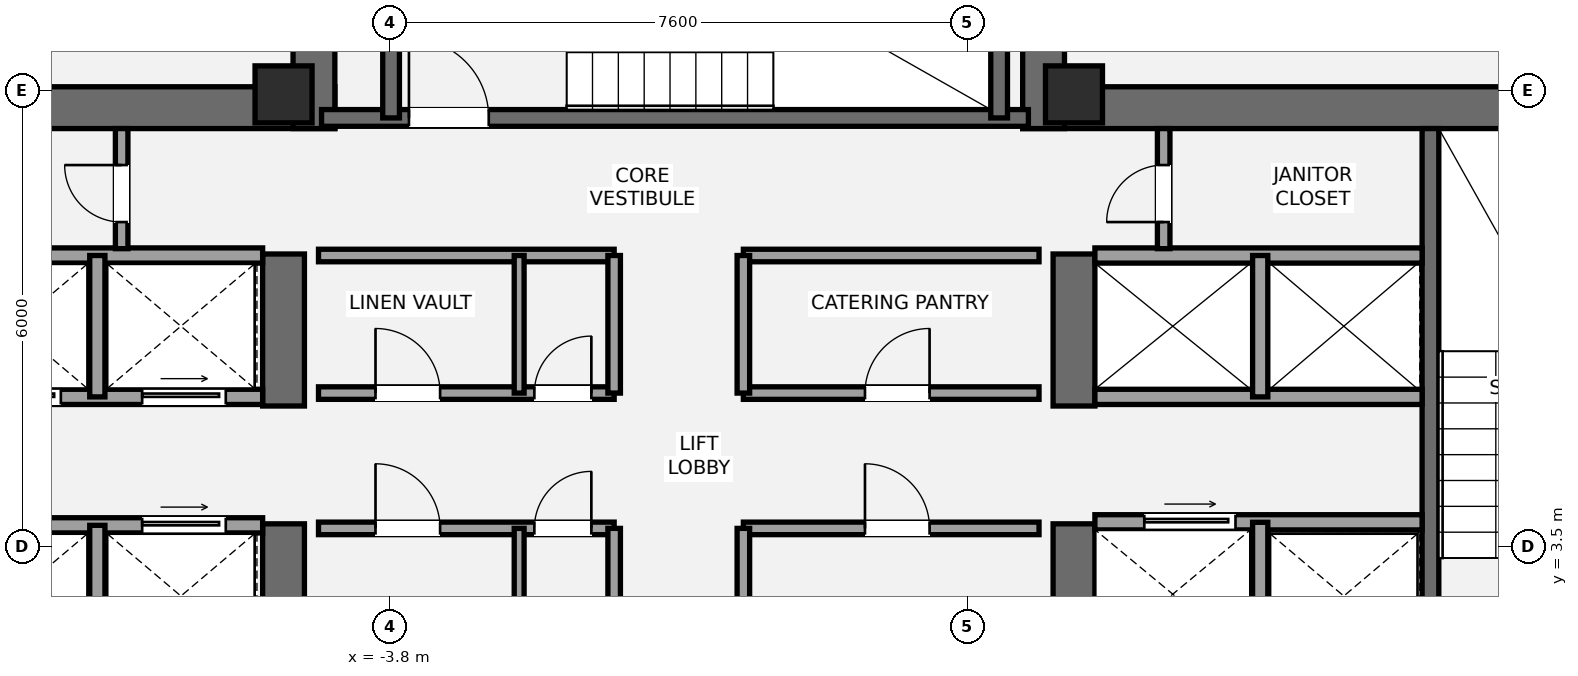
"""IFC4 building model, lengths in metres.
Left out: names, types, materials, properties, quantities, classifications, styles, units other than length and angle.
Written with IfcOpenShell. Run it as: python <this file> out.ifc"""

import sys

from ifc_helpers import new_model, si_unit, direction, frame, frame_2d, origin, origin_2d, place, context, subcontext, project, spatial, rectangle, extrude, element, fill, save


model = new_model("IFC4")
c1 = context("Model", 3, precision=1e-05, world=origin(), true_north=direction((0.0, 1.0)))
c2 = subcontext(c1, "Body", "Model", "MODEL_VIEW")
j1 = project(units=[si_unit("LENGTHUNIT", "METRE"), si_unit("PLANEANGLEUNIT", "RADIAN")], contexts=[c1])
p1 = place(None, origin())
s1 = spatial("IfcSite", under=j1, at=p1, CompositionType="ELEMENT")
p2 = place(p1, origin())
s2 = spatial("IfcBuilding", under=s1, at=p2, CompositionType="ELEMENT")
p3 = place(p2, frame((0.0, 0.0, 216.3)))
s3 = spatial("IfcBuildingStorey", under=s2, at=p3, CompositionType="ELEMENT", Elevation=216.3)
p4 = place(p3, frame((-13.7, 9.275, 0.0), z_axis=(0.0, 0.0, 1.0), x_axis=(1.0, 0.0, 0.0)))
e1 = element("IfcWall", 1, at=p4, inside=s3, PredefinedType="SHEAR", context=c2, shape_type="SweptSolid", body=[
    extrude(rectangle(XDim=9.175, YDim=0.55, at=frame_2d((4.587, 0.0))), origin(), (0.0, 0.0, 1.0), 3.15),
])
p5 = place(p3, frame((-5.2, 1.3, 0.0), z_axis=(0.0, 0.0, 1.0), x_axis=(0.0, 1.0, 0.0)))
e2 = element("IfcWall", 2, at=p5, inside=s3, PredefinedType="SHEAR", context=c2, shape_type="SweptSolid", body=[
    extrude(rectangle(XDim=2.5, YDim=0.55, at=frame_2d((1.25, 0.0))), origin(), (0.0, 0.0, 1.0), 3.15),
])
p6 = place(p3, frame((-5.2, 5.35, 0.0), z_axis=(0.0, 0.0, 1.0), x_axis=(0.0, 1.0, 0.0)))
e3 = element("IfcWall", 3, at=p6, inside=s3, PredefinedType="SHEAR", context=c2, shape_type="SweptSolid", body=[
    extrude(rectangle(XDim=2.0, YDim=0.55, at=frame_2d((1.0, 0.0))), origin(), (0.0, 0.0, 1.0), 3.15),
])
p7 = place(p3, frame((4.525, 9.275, 0.0), z_axis=(0.0, 0.0, 1.0), x_axis=(1.0, 0.0, 0.0)))
e4 = element("IfcWall", 4, at=p7, inside=s3, PredefinedType="SHEAR", context=c2, shape_type="SweptSolid", body=[
    extrude(rectangle(XDim=9.175, YDim=0.55, at=frame_2d((4.587, 0.0))), origin(), (0.0, 0.0, 1.0), 3.15),
])
p8 = place(p3, frame((5.2, 1.3, 0.0), z_axis=(0.0, 0.0, 1.0), x_axis=(0.0, 1.0, 0.0)))
e5 = element("IfcWall", 5, at=p8, inside=s3, PredefinedType="SHEAR", context=c2, shape_type="SweptSolid", body=[
    extrude(rectangle(XDim=2.5, YDim=0.55, at=frame_2d((1.25, 0.0))), origin(), (0.0, 0.0, 1.0), 3.15),
])
p9 = place(p3, frame((5.2, 5.35, 0.0), z_axis=(0.0, 0.0, 1.0), x_axis=(0.0, 1.0, 0.0)))
e6 = element("IfcWall", 6, at=p9, inside=s3, PredefinedType="SHEAR", context=c2, shape_type="SweptSolid", body=[
    extrude(rectangle(XDim=2.0, YDim=0.55, at=frame_2d((1.0, 0.0))), origin(), (0.0, 0.0, 1.0), 3.15),
])
p10 = place(p3, frame((9.89, 1.85, 0.0), z_axis=(0.0, 0.0, 1.0), x_axis=(0.0, 1.0, 0.0)))
e7 = element("IfcWall", 7, at=p10, inside=s3, PredefinedType="SHEAR", context=c2, shape_type="SweptSolid", body=[
    extrude(rectangle(XDim=7.15, YDim=0.22, at=frame_2d((3.575, 0.0))), origin(), (0.0, 0.0, 1.0), 3.15),
])
for number, where, z_axis, x_axis in (
    (8, (-4.8, 9.0, 0.0), (0.0, 0.0, 1.0), (0.0, 1.0, 0.0)),
    (9, (4.8, 9.0, 0.0), (0.0, 0.0, 1.0), (0.0, 1.0, 0.0)),
):
    element("IfcWall", number, at=place(p3, frame(where, z_axis=z_axis, x_axis=x_axis)), inside=s3, PredefinedType="SHEAR", context=c2, shape_type="SweptSolid", body=[
        extrude(rectangle(XDim=3.95, YDim=0.55, at=frame_2d((1.975, 0.0))), origin(), (0.0, 0.0, 1.0), 3.15),
    ])
p11 = place(p3, frame((-4.7, 9.14, 0.0), z_axis=(0.0, 0.0, 1.0), x_axis=(1.0, 0.0, 0.0)))
e10 = element("IfcWall", 10, at=p11, inside=s3, PredefinedType="SHEAR", context=c2, shape_type="SweptSolid", body=[
    extrude(rectangle(XDim=9.3, YDim=0.22, at=frame_2d((4.65, 0.0))), origin(), (0.0, 0.0, 1.0), 3.15),
])
p12 = place(p11, frame((1.15, 0.0, 0.0)))
e11 = element("IfcOpeningElement", 11, at=p12, cuts=e10, PredefinedType="OPENING", context=c2, shape_type="SweptSolid", body=[
    extrude(rectangle(XDim=1.05, YDim=2.15, at=frame_2d((0.525, 1.075))), frame((0.0, 0.12, 0.0), z_axis=(0.0, -1.0, 0.0), x_axis=(1.0, 0.0, 0.0)), (0.0, 0.0, 1.0), 0.24),
])
for number, where, z_axis, x_axis in (
    (12, (-3.785, 9.14, 0.0), (0.0, 0.0, 1.0), (0.0, 1.0, 0.0)),
    (13, (4.215, 9.14, 0.0), (0.0, 0.0, 1.0), (0.0, 1.0, 0.0)),
):
    element("IfcWall", number, at=place(p3, frame(where, z_axis=z_axis, x_axis=x_axis)), inside=s3, PredefinedType="SHEAR", context=c2, shape_type="SweptSolid", body=[
        extrude(rectangle(XDim=3.26, YDim=0.22, at=frame_2d((1.63, 0.0))), origin(), (0.0, 0.0, 1.0), 3.15),
    ])
for number, where, z_axis, x_axis in (
    (14, (-5.2, 9.45, 0.0), (0.0, 0.0, 1.0), (1.0, 0.0, 0.0)),
    (15, (5.2, 9.45, 0.0), (0.0, 0.0, 1.0), (1.0, 0.0, 0.0)),
):
    element("IfcColumn", number, at=place(p3, frame(where, z_axis=z_axis, x_axis=x_axis)), inside=s3, PredefinedType="PILASTER", context=c2, shape_type="SweptSolid", body=[
        extrude(rectangle(XDim=0.75, YDim=0.75, at=origin_2d()), origin(), (0.0, 0.0, 1.0), 3.15),
    ])
p13 = place(p3, frame((-9.78, 3.78, 0.0), z_axis=(0.0, 0.0, 1.0), x_axis=(1.0, 0.0, 0.0)))
e16 = element("IfcWall", 16, at=p13, inside=s3, PredefinedType="SOLIDWALL", context=c2, shape_type="SweptSolid", body=[
    extrude(rectangle(XDim=4.305, YDim=0.2, at=frame_2d((2.152, 0.0))), origin(), (0.0, 0.0, 1.0), 2.97),
])
p14 = place(p13, frame((2.72, 0.0, 0.0)))
e17 = element("IfcOpeningElement", 17, at=p14, cuts=e16, PredefinedType="OPENING", context=c2, shape_type="SweptSolid", body=[
    extrude(rectangle(XDim=1.1, YDim=2.2, at=frame_2d((0.55, 1.1))), frame((0.0, 0.11, 0.0), z_axis=(0.0, -1.0, 0.0), x_axis=(1.0, 0.0, 0.0)), (0.0, 0.0, 1.0), 0.22),
])
p15 = place(p3, frame((-7.65, 1.85, 0.0), z_axis=(0.0, 0.0, 1.0), x_axis=(0.0, 1.0, 0.0)))
e18 = element("IfcWall", 18, at=p15, inside=s3, PredefinedType="SOLIDWALL", context=c2, shape_type="SweptSolid", body=[
    extrude(rectangle(XDim=1.93, YDim=0.2, at=frame_2d((0.965, 0.0))), origin(), (0.0, 0.0, 1.0), 2.97),
])
p16 = place(p3, frame((-9.78, 5.47, 0.0), z_axis=(0.0, 0.0, 1.0), x_axis=(1.0, 0.0, 0.0)))
e19 = element("IfcWall", 19, at=p16, inside=s3, PredefinedType="SOLIDWALL", context=c2, shape_type="SweptSolid", body=[
    extrude(rectangle(XDim=4.305, YDim=0.2, at=frame_2d((2.152, 0.0))), origin(), (0.0, 0.0, 1.0), 2.97),
])
p17 = place(p16, frame((0.55, 0.0, 0.0)))
e20 = element("IfcOpeningElement", 20, at=p17, cuts=e19, PredefinedType="OPENING", context=c2, shape_type="SweptSolid", body=[
    extrude(rectangle(XDim=1.1, YDim=2.2, at=frame_2d((0.55, 1.1))), frame((0.0, 0.11, 0.0), z_axis=(0.0, -1.0, 0.0), x_axis=(1.0, 0.0, 0.0)), (0.0, 0.0, 1.0), 0.22),
])
p18 = place(p16, frame((2.72, 0.0, 0.0)))
e21 = element("IfcOpeningElement", 21, at=p18, cuts=e19, PredefinedType="OPENING", context=c2, shape_type="SweptSolid", body=[
    extrude(rectangle(XDim=1.1, YDim=2.2, at=frame_2d((0.55, 1.1))), frame((0.0, 0.11, 0.0), z_axis=(0.0, -1.0, 0.0), x_axis=(1.0, 0.0, 0.0)), (0.0, 0.0, 1.0), 0.22),
])
p19 = place(p3, frame((-9.78, 7.33, 0.0), z_axis=(0.0, 0.0, 1.0), x_axis=(1.0, 0.0, 0.0)))
e22 = element("IfcWall", 22, at=p19, inside=s3, PredefinedType="SOLIDWALL", context=c2, shape_type="SweptSolid", body=[
    extrude(rectangle(XDim=4.305, YDim=0.2, at=frame_2d((2.152, 0.0))), origin(), (0.0, 0.0, 1.0), 2.97),
])
p20 = place(p3, frame((-7.65, 5.47, 0.0), z_axis=(0.0, 0.0, 1.0), x_axis=(0.0, 1.0, 0.0)))
e23 = element("IfcWall", 23, at=p20, inside=s3, PredefinedType="SOLIDWALL", context=c2, shape_type="SweptSolid", body=[
    extrude(rectangle(XDim=1.86, YDim=0.2, at=frame_2d((0.93, 0.0))), origin(), (0.0, 0.0, 1.0), 2.97),
])
p21 = place(p3, frame((5.475, 3.82, 0.0), z_axis=(0.0, 0.0, 1.0), x_axis=(1.0, 0.0, 0.0)))
e24 = element("IfcWall", 24, at=p21, inside=s3, PredefinedType="SOLIDWALL", context=c2, shape_type="SweptSolid", body=[
    extrude(rectangle(XDim=4.305, YDim=0.2, at=frame_2d((2.152, 0.0))), origin(), (0.0, 0.0, 1.0), 2.97),
])
p22 = place(p21, frame((0.65, 0.0, 0.0)))
e25 = element("IfcOpeningElement", 25, at=p22, cuts=e24, PredefinedType="OPENING", context=c2, shape_type="SweptSolid", body=[
    extrude(rectangle(XDim=1.2, YDim=2.2, at=frame_2d((0.6, 1.1))), frame((0.0, 0.11, 0.0), z_axis=(0.0, -1.0, 0.0), x_axis=(1.0, 0.0, 0.0)), (0.0, 0.0, 1.0), 0.22),
])
p23 = place(p3, frame((7.65, 1.85, 0.0), z_axis=(0.0, 0.0, 1.0), x_axis=(0.0, 1.0, 0.0)))
e26 = element("IfcWall", 26, at=p23, inside=s3, PredefinedType="SOLIDWALL", context=c2, shape_type="SweptSolid", body=[
    extrude(rectangle(XDim=1.97, YDim=0.2, at=frame_2d((0.985, 0.0))), origin(), (0.0, 0.0, 1.0), 2.97),
])
for number, where, z_axis, x_axis in (
    (27, (5.475, 5.47, 0.0), (0.0, 0.0, 1.0), (1.0, 0.0, 0.0)),
    (28, (5.475, 7.33, 0.0), (0.0, 0.0, 1.0), (1.0, 0.0, 0.0)),
):
    element("IfcWall", number, at=place(p3, frame(where, z_axis=z_axis, x_axis=x_axis)), inside=s3, PredefinedType="SOLIDWALL", context=c2, shape_type="SweptSolid", body=[
        extrude(rectangle(XDim=4.305, YDim=0.2, at=frame_2d((2.152, 0.0))), origin(), (0.0, 0.0, 1.0), 2.97),
    ])
p24 = place(p3, frame((7.65, 5.47, 0.0), z_axis=(0.0, 0.0, 1.0), x_axis=(0.0, 1.0, 0.0)))
e29 = element("IfcWall", 29, at=p24, inside=s3, PredefinedType="SOLIDWALL", context=c2, shape_type="SweptSolid", body=[
    extrude(rectangle(XDim=1.86, YDim=0.2, at=frame_2d((0.93, 0.0))), origin(), (0.0, 0.0, 1.0), 2.97),
])
p25 = place(p3, frame((-4.74, 3.74, 0.0), z_axis=(0.0, 0.0, 1.0), x_axis=(1.0, 0.0, 0.0)))
e30 = element("IfcWall", 30, at=p25, inside=s3, PredefinedType="PARTITIONING", context=c2, shape_type="SweptSolid", body=[
    extrude(rectangle(XDim=3.89, YDim=0.165, at=frame_2d((1.945, 0.0))), origin(), (0.0, 0.0, 1.0), 2.97),
])
p26 = place(p25, frame((0.75, 0.0, 0.0)))
e31 = element("IfcOpeningElement", 31, at=p26, cuts=e30, PredefinedType="OPENING", context=c2, shape_type="SweptSolid", body=[
    extrude(rectangle(XDim=0.85, YDim=2.1, at=frame_2d((0.425, 1.05))), frame((0.0, 0.093, 0.0), z_axis=(0.0, -1.0, 0.0), x_axis=(1.0, 0.0, 0.0)), (0.0, 0.0, 1.0), 0.185),
])
p27 = place(p25, frame((2.84, 0.0, 0.0)))
e32 = element("IfcOpeningElement", 32, at=p27, cuts=e30, PredefinedType="OPENING", context=c2, shape_type="SweptSolid", body=[
    extrude(rectangle(XDim=0.75, YDim=2.1, at=frame_2d((0.375, 1.05))), frame((0.0, 0.093, 0.0), z_axis=(0.0, -1.0, 0.0), x_axis=(1.0, 0.0, 0.0)), (0.0, 0.0, 1.0), 0.185),
])
p28 = place(p3, frame((-0.85, 1.92, 0.0), z_axis=(0.0, 0.0, 1.0), x_axis=(0.0, 1.0, 0.0)))
e33 = element("IfcWall", 33, at=p28, inside=s3, PredefinedType="PARTITIONING", context=c2, shape_type="SweptSolid", body=[
    extrude(rectangle(XDim=1.82, YDim=0.165, at=frame_2d((0.91, 0.0))), origin(), (0.0, 0.0, 1.0), 2.97),
])
p29 = place(p3, frame((0.85, 3.74, 0.0), z_axis=(0.0, 0.0, 1.0), x_axis=(1.0, 0.0, 0.0)))
e34 = element("IfcWall", 34, at=p29, inside=s3, PredefinedType="PARTITIONING", context=c2, shape_type="SweptSolid", body=[
    extrude(rectangle(XDim=3.89, YDim=0.165, at=frame_2d((1.945, 0.0))), origin(), (0.0, 0.0, 1.0), 2.97),
])
p30 = place(p29, frame((1.6, 0.0, 0.0)))
e35 = element("IfcOpeningElement", 35, at=p30, cuts=e34, PredefinedType="OPENING", context=c2, shape_type="SweptSolid", body=[
    extrude(rectangle(XDim=0.85, YDim=2.1, at=frame_2d((0.425, 1.05))), frame((0.0, 0.093, 0.0), z_axis=(0.0, -1.0, 0.0), x_axis=(1.0, 0.0, 0.0)), (0.0, 0.0, 1.0), 0.185),
])
p31 = place(p3, frame((0.85, 1.92, 0.0), z_axis=(0.0, 0.0, 1.0), x_axis=(0.0, 1.0, 0.0)))
e36 = element("IfcWall", 36, at=p31, inside=s3, PredefinedType="PARTITIONING", context=c2, shape_type="SweptSolid", body=[
    extrude(rectangle(XDim=1.82, YDim=0.165, at=frame_2d((0.91, 0.0))), origin(), (0.0, 0.0, 1.0), 2.97),
])
p32 = place(p3, frame((-2.1, 1.92, 0.0), z_axis=(0.0, 0.0, 1.0), x_axis=(0.0, 1.0, 0.0)))
e37 = element("IfcWall", 37, at=p32, inside=s3, PredefinedType="PARTITIONING", context=c2, shape_type="SweptSolid", body=[
    extrude(rectangle(XDim=1.82, YDim=0.13, at=frame_2d((0.91, 0.0))), origin(), (0.0, 0.0, 1.0), 2.97),
])
p33 = place(p3, frame((-4.74, 5.52, 0.0), z_axis=(0.0, 0.0, 1.0), x_axis=(1.0, 0.0, 0.0)))
e38 = element("IfcWall", 38, at=p33, inside=s3, PredefinedType="PARTITIONING", context=c2, shape_type="SweptSolid", body=[
    extrude(rectangle(XDim=3.89, YDim=0.165, at=frame_2d((1.945, 0.0))), origin(), (0.0, 0.0, 1.0), 2.97),
])
p34 = place(p33, frame((0.75, 0.0, 0.0)))
e39 = element("IfcOpeningElement", 39, at=p34, cuts=e38, PredefinedType="OPENING", context=c2, shape_type="SweptSolid", body=[
    extrude(rectangle(XDim=0.85, YDim=2.1, at=frame_2d((0.425, 1.05))), frame((0.0, 0.093, 0.0), z_axis=(0.0, -1.0, 0.0), x_axis=(1.0, 0.0, 0.0)), (0.0, 0.0, 1.0), 0.185),
])
p35 = place(p33, frame((2.84, 0.0, 0.0)))
e40 = element("IfcOpeningElement", 40, at=p35, cuts=e38, PredefinedType="OPENING", context=c2, shape_type="SweptSolid", body=[
    extrude(rectangle(XDim=0.75, YDim=2.1, at=frame_2d((0.375, 1.05))), frame((0.0, 0.093, 0.0), z_axis=(0.0, -1.0, 0.0), x_axis=(1.0, 0.0, 0.0)), (0.0, 0.0, 1.0), 0.185),
])
p36 = place(p3, frame((-4.74, 7.33, 0.0), z_axis=(0.0, 0.0, 1.0), x_axis=(1.0, 0.0, 0.0)))
e41 = element("IfcWall", 41, at=p36, inside=s3, PredefinedType="PARTITIONING", context=c2, shape_type="SweptSolid", body=[
    extrude(rectangle(XDim=3.89, YDim=0.165, at=frame_2d((1.945, 0.0))), origin(), (0.0, 0.0, 1.0), 2.97),
])
p37 = place(p3, frame((-0.85, 5.52, 0.0), z_axis=(0.0, 0.0, 1.0), x_axis=(0.0, 1.0, 0.0)))
e42 = element("IfcWall", 42, at=p37, inside=s3, PredefinedType="PARTITIONING", context=c2, shape_type="SweptSolid", body=[
    extrude(rectangle(XDim=1.81, YDim=0.165, at=frame_2d((0.905, 0.0))), origin(), (0.0, 0.0, 1.0), 2.97),
])
p38 = place(p3, frame((0.85, 5.52, 0.0), z_axis=(0.0, 0.0, 1.0), x_axis=(1.0, 0.0, 0.0)))
e43 = element("IfcWall", 43, at=p38, inside=s3, PredefinedType="PARTITIONING", context=c2, shape_type="SweptSolid", body=[
    extrude(rectangle(XDim=3.89, YDim=0.165, at=frame_2d((1.945, 0.0))), origin(), (0.0, 0.0, 1.0), 2.97),
])
p39 = place(p38, frame((1.6, 0.0, 0.0)))
e44 = element("IfcOpeningElement", 44, at=p39, cuts=e43, PredefinedType="OPENING", context=c2, shape_type="SweptSolid", body=[
    extrude(rectangle(XDim=0.85, YDim=2.1, at=frame_2d((0.425, 1.05))), frame((0.0, 0.093, 0.0), z_axis=(0.0, -1.0, 0.0), x_axis=(1.0, 0.0, 0.0)), (0.0, 0.0, 1.0), 0.185),
])
p40 = place(p3, frame((0.85, 7.33, 0.0), z_axis=(0.0, 0.0, 1.0), x_axis=(1.0, 0.0, 0.0)))
e45 = element("IfcWall", 45, at=p40, inside=s3, PredefinedType="PARTITIONING", context=c2, shape_type="SweptSolid", body=[
    extrude(rectangle(XDim=3.89, YDim=0.165, at=frame_2d((1.945, 0.0))), origin(), (0.0, 0.0, 1.0), 2.97),
])
p41 = place(p3, frame((0.85, 5.52, 0.0), z_axis=(0.0, 0.0, 1.0), x_axis=(0.0, 1.0, 0.0)))
e46 = element("IfcWall", 46, at=p41, inside=s3, PredefinedType="PARTITIONING", context=c2, shape_type="SweptSolid", body=[
    extrude(rectangle(XDim=1.81, YDim=0.165, at=frame_2d((0.905, 0.0))), origin(), (0.0, 0.0, 1.0), 2.97),
])
p42 = place(p3, frame((-2.1, 5.52, 0.0), z_axis=(0.0, 0.0, 1.0), x_axis=(0.0, 1.0, 0.0)))
e47 = element("IfcWall", 47, at=p42, inside=s3, PredefinedType="PARTITIONING", context=c2, shape_type="SweptSolid", body=[
    extrude(rectangle(XDim=1.81, YDim=0.13, at=frame_2d((0.905, 0.0))), origin(), (0.0, 0.0, 1.0), 2.97),
])
p43 = place(p3, frame((-7.33, 7.42, 0.0), z_axis=(0.0, 0.0, 1.0), x_axis=(0.0, 1.0, 0.0)))
e48 = element("IfcWall", 48, at=p43, inside=s3, PredefinedType="PARTITIONING", context=c2, shape_type="SweptSolid", body=[
    extrude(rectangle(XDim=1.58, YDim=0.165, at=frame_2d((0.79, 0.0))), origin(), (0.0, 0.0, 1.0), 2.97),
])
p44 = place(p43, frame((0.35, 0.0, 0.0)))
e49 = element("IfcOpeningElement", 49, at=p44, cuts=e48, PredefinedType="OPENING", context=c2, shape_type="SweptSolid", body=[
    extrude(rectangle(XDim=0.75, YDim=2.1, at=frame_2d((0.375, 1.05))), frame((0.0, 0.093, 0.0), z_axis=(0.0, -1.0, 0.0), x_axis=(1.0, 0.0, 0.0)), (0.0, 0.0, 1.0), 0.185),
])
p45 = place(p3, frame((6.38, 7.42, 0.0), z_axis=(0.0, 0.0, 1.0), x_axis=(0.0, 1.0, 0.0)))
e50 = element("IfcWall", 50, at=p45, inside=s3, PredefinedType="PARTITIONING", context=c2, shape_type="SweptSolid", body=[
    extrude(rectangle(XDim=1.58, YDim=0.165, at=frame_2d((0.79, 0.0))), origin(), (0.0, 0.0, 1.0), 2.97),
])
p46 = place(p45, frame((0.35, 0.0, 0.0)))
e51 = element("IfcOpeningElement", 51, at=p46, cuts=e50, PredefinedType="OPENING", context=c2, shape_type="SweptSolid", body=[
    extrude(rectangle(XDim=0.75, YDim=2.1, at=frame_2d((0.375, 1.05))), frame((0.0, 0.093, 0.0), z_axis=(0.0, -1.0, 0.0), x_axis=(1.0, 0.0, 0.0)), (0.0, 0.0, 1.0), 0.185),
])
p47 = place(p12, origin())
e52 = element("IfcDoor", 52, at=p47, inside=s3, OperationType="SINGLE_SWING_LEFT", PredefinedType="DOOR", context=c2, shape_type="SweptSolid", body=[
    extrude(rectangle(XDim=1.05, YDim=2.15, at=frame_2d((0.525, 1.075))), frame((0.0, 0.025, 0.0), z_axis=(0.0, -1.0, 0.0), x_axis=(1.0, 0.0, 0.0)), (0.0, 0.0, 1.0), 0.05),
])
fill(e11, e52)
p48 = place(p17, origin())
e53 = element("IfcDoor", 53, at=p48, inside=s3, OperationType="SLIDING_TO_LEFT", PredefinedType="DOOR", context=c2, shape_type="SweptSolid", body=[
    extrude(rectangle(XDim=1.1, YDim=2.2, at=frame_2d((0.55, 1.1))), frame((0.0, 0.025, 0.0), z_axis=(0.0, -1.0, 0.0), x_axis=(1.0, 0.0, 0.0)), (0.0, 0.0, 1.0), 0.05),
])
fill(e20, e53)
p49 = place(p18, origin())
e54 = element("IfcDoor", 54, at=p49, inside=s3, OperationType="SLIDING_TO_LEFT", PredefinedType="DOOR", context=c2, shape_type="SweptSolid", body=[
    extrude(rectangle(XDim=1.1, YDim=2.2, at=frame_2d((0.55, 1.1))), frame((0.0, 0.025, 0.0), z_axis=(0.0, -1.0, 0.0), x_axis=(1.0, 0.0, 0.0)), (0.0, 0.0, 1.0), 0.05),
])
fill(e21, e54)
p50 = place(p14, origin())
e55 = element("IfcDoor", 55, at=p50, inside=s3, OperationType="SLIDING_TO_LEFT", PredefinedType="DOOR", context=c2, shape_type="SweptSolid", body=[
    extrude(rectangle(XDim=1.1, YDim=2.2, at=frame_2d((0.55, 1.1))), frame((0.0, 0.025, 0.0), z_axis=(0.0, -1.0, 0.0), x_axis=(1.0, 0.0, 0.0)), (0.0, 0.0, 1.0), 0.05),
])
fill(e17, e55)
p51 = place(p22, origin())
e56 = element("IfcDoor", 56, at=p51, inside=s3, OperationType="SLIDING_TO_RIGHT", PredefinedType="DOOR", context=c2, shape_type="SweptSolid", body=[
    extrude(rectangle(XDim=1.2, YDim=2.2, at=frame_2d((0.6, 1.1))), frame((0.0, 0.025, 0.0), z_axis=(0.0, -1.0, 0.0), x_axis=(1.0, 0.0, 0.0)), (0.0, 0.0, 1.0), 0.05),
])
fill(e25, e56)
p52 = place(p26, origin())
e57 = element("IfcDoor", 57, at=p52, inside=s3, OperationType="SINGLE_SWING_LEFT", PredefinedType="DOOR", context=c2, shape_type="SweptSolid", body=[
    extrude(rectangle(XDim=0.85, YDim=2.1, at=frame_2d((0.425, 1.05))), frame((0.0, 0.025, 0.0), z_axis=(0.0, -1.0, 0.0), x_axis=(1.0, 0.0, 0.0)), (0.0, 0.0, 1.0), 0.05),
])
fill(e31, e57)
p53 = place(p27, origin())
e58 = element("IfcDoor", 58, at=p53, inside=s3, OperationType="SINGLE_SWING_RIGHT", PredefinedType="DOOR", context=c2, shape_type="SweptSolid", body=[
    extrude(rectangle(XDim=0.75, YDim=2.1, at=frame_2d((0.375, 1.05))), frame((0.0, 0.025, 0.0), z_axis=(0.0, -1.0, 0.0), x_axis=(1.0, 0.0, 0.0)), (0.0, 0.0, 1.0), 0.05),
])
fill(e32, e58)
p54 = place(p30, origin())
e59 = element("IfcDoor", 59, at=p54, inside=s3, OperationType="SINGLE_SWING_LEFT", PredefinedType="DOOR", context=c2, shape_type="SweptSolid", body=[
    extrude(rectangle(XDim=0.85, YDim=2.1, at=frame_2d((0.425, 1.05))), frame((0.0, 0.025, 0.0), z_axis=(0.0, -1.0, 0.0), x_axis=(1.0, 0.0, 0.0)), (0.0, 0.0, 1.0), 0.05),
])
fill(e35, e59)
p55 = place(p34, origin())
e60 = element("IfcDoor", 60, at=p55, inside=s3, OperationType="SINGLE_SWING_LEFT", PredefinedType="DOOR", context=c2, shape_type="SweptSolid", body=[
    extrude(rectangle(XDim=0.85, YDim=2.1, at=frame_2d((0.425, 1.05))), frame((0.0, 0.025, 0.0), z_axis=(0.0, -1.0, 0.0), x_axis=(1.0, 0.0, 0.0)), (0.0, 0.0, 1.0), 0.05),
])
fill(e39, e60)
p56 = place(p35, origin())
e61 = element("IfcDoor", 61, at=p56, inside=s3, OperationType="SINGLE_SWING_RIGHT", PredefinedType="DOOR", context=c2, shape_type="SweptSolid", body=[
    extrude(rectangle(XDim=0.75, YDim=2.1, at=frame_2d((0.375, 1.05))), frame((0.0, 0.025, 0.0), z_axis=(0.0, -1.0, 0.0), x_axis=(1.0, 0.0, 0.0)), (0.0, 0.0, 1.0), 0.05),
])
fill(e40, e61)
p57 = place(p39, origin())
e62 = element("IfcDoor", 62, at=p57, inside=s3, OperationType="SINGLE_SWING_RIGHT", PredefinedType="DOOR", context=c2, shape_type="SweptSolid", body=[
    extrude(rectangle(XDim=0.85, YDim=2.1, at=frame_2d((0.425, 1.05))), frame((0.0, 0.025, 0.0), z_axis=(0.0, -1.0, 0.0), x_axis=(1.0, 0.0, 0.0)), (0.0, 0.0, 1.0), 0.05),
])
fill(e44, e62)
p58 = place(p44, origin())
e63 = element("IfcDoor", 63, at=p58, inside=s3, OperationType="SINGLE_SWING_RIGHT", PredefinedType="DOOR", context=c2, shape_type="SweptSolid", body=[
    extrude(rectangle(XDim=0.75, YDim=2.1, at=frame_2d((0.375, 1.05))), frame((0.0, 0.025, 0.0), z_axis=(0.0, -1.0, 0.0), x_axis=(1.0, 0.0, 0.0)), (0.0, 0.0, 1.0), 0.05),
])
fill(e49, e63)
p59 = place(p46, origin())
e64 = element("IfcDoor", 64, at=p59, inside=s3, OperationType="SINGLE_SWING_LEFT", PredefinedType="DOOR", context=c2, shape_type="SweptSolid", body=[
    extrude(rectangle(XDim=0.75, YDim=2.1, at=frame_2d((0.375, 1.05))), frame((0.0, 0.025, 0.0), z_axis=(0.0, -1.0, 0.0), x_axis=(1.0, 0.0, 0.0)), (0.0, 0.0, 1.0), 0.05),
])
fill(e51, e64)
save(model, sys.argv[1])
